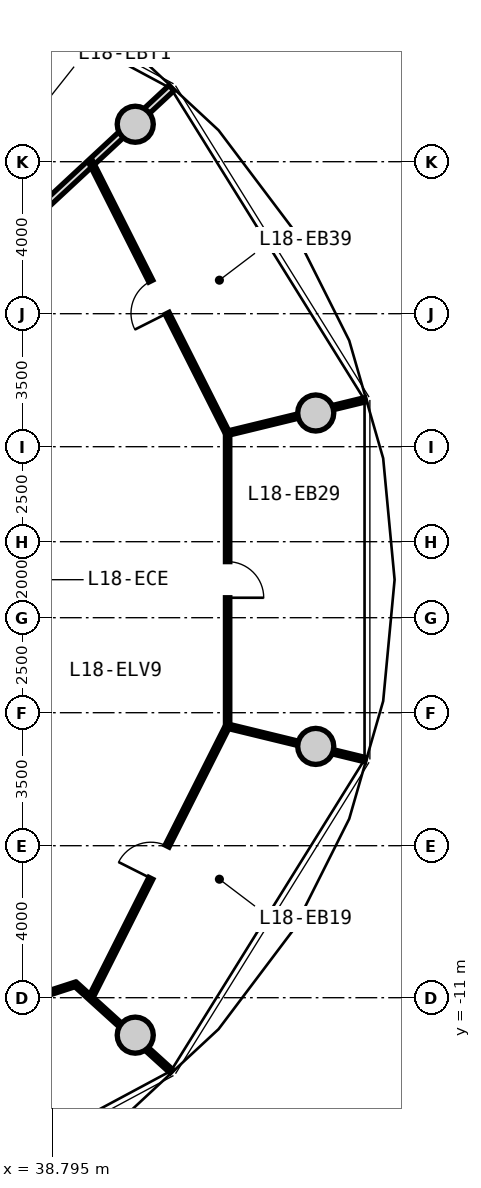
"""IFC4 building model, lengths in metres.
Left out: names, types, materials, properties, quantities, classifications, styles, units other than length and angle.
Written with IfcOpenShell. Run it as: python <this file> out.ifc"""

import sys

from ifc_helpers import new_model, si_unit, direction, frame, frame_2d, origin, origin_2d, place, context, subcontext, project, spatial, rectangle, circle, extrude, source, transform, mapped, element, fill, save


model = new_model("IFC4")
c1 = context("Model", 3, precision=1e-05, world=origin(), true_north=direction((0.0, 1.0)))
c2 = subcontext(c1, "Body", "Model", "MODEL_VIEW")
j1 = project(units=[si_unit("LENGTHUNIT", "METRE"), si_unit("PLANEANGLEUNIT", "RADIAN")], contexts=[c1])
p1 = place(None, origin())
s1 = spatial("IfcSite", under=j1, at=p1, CompositionType="ELEMENT")
p2 = place(p1, origin())
s2 = spatial("IfcBuilding", under=s1, at=p2, CompositionType="ELEMENT")
p3 = place(p2, frame((0.0, 0.0, 61.25)))
s3 = spatial("IfcBuildingStorey", under=s2, at=p3, CompositionType="ELEMENT", Elevation=61.25)
m1 = source(origin(), c2, "Body", "SweptSolid", [
    extrude(circle(Radius=0.475, at=origin_2d()), origin(), (0.0, 0.0, 1.0), 3.05),
])
for number, where, z_axis, x_axis in (
    (1, (45.725, 4.387, 0.0), (0.0, 0.0, 1.0), (1.0, 0.0, 0.0)),
    (2, (40.975, 11.985, 0.0), (0.0, 0.0, 1.0), (1.0, 0.0, 0.0)),
    (3, (40.975, -11.985, 0.0), (0.0, 0.0, 1.0), (1.0, 0.0, 0.0)),
    (4, (45.725, -4.387, 0.0), (0.0, 0.0, 1.0), (1.0, 0.0, 0.0)),
):
    element("IfcColumn", number, at=place(p3, frame(where, z_axis=z_axis, x_axis=x_axis)), inside=s3, PredefinedType="COLUMN", context=c2, shape_type="MappedRepresentation", body=[
        mapped(m1, transform((0.0, 0.0, 0.0), x_axis=(1.0, 0.0, 0.0), y_axis=(0.0, 1.0, 0.0), z_axis=(0.0, 0.0, 1.0), scale=1.0)),
    ])
m2 = source(origin(), c2, "Body", "SweptSolid", [
    extrude(rectangle(XDim=7.435, YDim=0.19, at=frame_2d((3.717, 0.0))), origin(), (0.0, 0.0, 1.0), 2.225),
])
p4 = place(p3, frame((36.483, 7.88, 0.0), z_axis=(0.0, 0.0, 1.0), x_axis=(0.732651956848, 0.680603489652, 0.0)))
e5 = element("IfcWall", 5, at=p4, inside=s3, PredefinedType="PARTITIONING", context=c2, shape_type="MappedRepresentation", body=[
    mapped(m2, transform((0.0, 0.0, 0.0), x_axis=(1.0, 0.0, 0.0), y_axis=(0.0, 1.0, 0.0), z_axis=(0.0, 0.0, 1.0), scale=1.0)),
])
m3 = source(origin(), c2, "Body", "SweptSolid", [
    extrude(rectangle(XDim=8.018, YDim=0.115, at=frame_2d((4.009, 0.0))), origin(), (0.0, 0.0, 1.0), 2.775),
])
p5 = place(p3, frame((39.795, -11.014, 0.0), z_axis=(0.0, 0.0, 1.0), x_axis=(0.450134355233, 0.89296084026, 0.0)))
e6 = element("IfcWall", 6, at=p5, inside=s3, PredefinedType="PARTITIONING", context=c2, shape_type="MappedRepresentation", body=[
    mapped(m3, transform((0.0, 0.0, 0.0), x_axis=(1.0, 0.0, 0.0), y_axis=(0.0, 1.0, 0.0), z_axis=(0.0, 0.0, 1.0), scale=1.0)),
])
p6 = place(p5, frame((3.534, 0.0, 0.0)))
e7 = element("IfcOpeningElement", 7, at=p6, cuts=e6, PredefinedType="OPENING", context=c2, shape_type="SweptSolid", body=[
    extrude(rectangle(XDim=0.95, YDim=2.1, at=frame_2d((0.475, 1.05))), frame((0.0, 0.067, 0.0), z_axis=(0.0, -1.0, 0.0), x_axis=(1.0, 0.0, 0.0)), (0.0, 0.0, 1.0), 0.135),
])
m4 = source(origin(), c2, "Body", "SweptSolid", [
    extrude(rectangle(XDim=3.4, YDim=0.115, at=frame_2d((1.7, 0.0))), origin(), (0.0, 0.0, 1.0), 2.225),
])
p7 = place(p3, frame((39.411, -10.656, 0.0), z_axis=(0.0, 0.0, 1.0), x_axis=(0.740729005272, -0.671803945172, 0.0)))
e8 = element("IfcWall", 8, at=p7, inside=s3, PredefinedType="PARTITIONING", context=c2, shape_type="MappedRepresentation", body=[
    mapped(m4, transform((0.0, 0.0, 0.0), x_axis=(1.0, 0.0, 0.0), y_axis=(0.0, 1.0, 0.0), z_axis=(0.0, 0.0, 1.0), scale=1.0)),
])
m5 = source(origin(), c2, "Body", "SweptSolid", [
    extrude(rectangle(XDim=7.709, YDim=0.115, at=frame_2d((3.855, 0.0))), origin(), (0.0, 0.0, 1.0), 2.775),
])
p8 = place(p3, frame((43.406, -3.855, 0.0), z_axis=(0.0, 0.0, 1.0), x_axis=(0.0, 1.0, 0.0)))
e9 = element("IfcWall", 9, at=p8, inside=s3, PredefinedType="PARTITIONING", context=c2, shape_type="MappedRepresentation", body=[
    mapped(m5, transform((0.0, 0.0, 0.0), x_axis=(1.0, 0.0, 0.0), y_axis=(0.0, 1.0, 0.0), z_axis=(0.0, 0.0, 1.0), scale=1.0)),
])
p9 = place(p8, frame((3.38, 0.0, 0.0)))
e10 = element("IfcOpeningElement", 10, at=p9, cuts=e9, PredefinedType="OPENING", context=c2, shape_type="SweptSolid", body=[
    extrude(rectangle(XDim=0.95, YDim=2.1, at=frame_2d((0.475, 1.05))), frame((0.0, 0.067, 0.0), z_axis=(0.0, -1.0, 0.0), x_axis=(1.0, 0.0, 0.0)), (0.0, 0.0, 1.0), 0.135),
])
m6 = source(origin(), c2, "Body", "SweptSolid", [
    extrude(rectangle(XDim=3.728, YDim=0.115, at=frame_2d((1.864, 0.0))), origin(), (0.0, 0.0, 1.0), 2.225),
])
p10 = place(p3, frame((43.406, -3.855, 0.0), z_axis=(0.0, 0.0, 1.0), x_axis=(0.971641177968, -0.236460189624, 0.0)))
e11 = element("IfcWall", 11, at=p10, inside=s3, PredefinedType="PARTITIONING", context=c2, shape_type="MappedRepresentation", body=[
    mapped(m6, transform((0.0, 0.0, 0.0), x_axis=(1.0, 0.0, 0.0), y_axis=(0.0, 1.0, 0.0), z_axis=(0.0, 0.0, 1.0), scale=1.0)),
])
p11 = place(p3, frame((43.404, 3.854, 0.0), z_axis=(0.0, 0.0, 1.0), x_axis=(-0.450134355233, 0.89296084026, 0.0)))
e12 = element("IfcWall", 12, at=p11, inside=s3, PredefinedType="PARTITIONING", context=c2, shape_type="MappedRepresentation", body=[
    mapped(m3, transform((0.0, 0.0, 0.0), x_axis=(1.0, 0.0, 0.0), y_axis=(0.0, 1.0, 0.0), z_axis=(0.0, 0.0, 1.0), scale=1.0)),
])
p12 = place(p11, frame((3.534, 0.0, 0.0)))
e13 = element("IfcOpeningElement", 13, at=p12, cuts=e12, PredefinedType="OPENING", context=c2, shape_type="SweptSolid", body=[
    extrude(rectangle(XDim=0.95, YDim=2.1, at=frame_2d((0.475, 1.05))), frame((0.0, 0.067, 0.0), z_axis=(0.0, -1.0, 0.0), x_axis=(1.0, 0.0, 0.0)), (0.0, 0.0, 1.0), 0.135),
])
m7 = source(origin(), c2, "Body", "SweptSolid", [
    extrude(rectangle(XDim=3.73, YDim=0.115, at=frame_2d((1.865, 0.0))), origin(), (0.0, 0.0, 1.0), 2.225),
])
p13 = place(p3, frame((43.404, 3.854, 0.0), z_axis=(0.0, 0.0, 1.0), x_axis=(0.971644038568, 0.236448434791, 0.0)))
e14 = element("IfcWall", 14, at=p13, inside=s3, PredefinedType="PARTITIONING", context=c2, shape_type="MappedRepresentation", body=[
    mapped(m7, transform((0.0, 0.0, 0.0), x_axis=(1.0, 0.0, 0.0), y_axis=(0.0, 1.0, 0.0), z_axis=(0.0, 0.0, 1.0), scale=1.0)),
])
m8 = source(origin(), c2, "Body", "SweptSolid", [
    extrude(rectangle(XDim=4.22, YDim=0.115, at=frame_2d((2.11, 0.0))), origin(), (0.0, 0.0, 1.0), 2.775),
])
p14 = place(p3, frame((35.389, -11.95, 0.0), z_axis=(0.0, 0.0, 1.0), x_axis=(0.951130539873, 0.308789080315, 0.0)))
e15 = element("IfcWall", 15, at=p14, inside=s3, PredefinedType="PARTITIONING", context=c2, shape_type="MappedRepresentation", body=[
    mapped(m8, transform((0.0, 0.0, 0.0), x_axis=(1.0, 0.0, 0.0), y_axis=(0.0, 1.0, 0.0), z_axis=(0.0, 0.0, 1.0), scale=1.0)),
])
p15 = place(p14, frame((1.635, 0.0, 0.0)))
e16 = element("IfcOpeningElement", 16, at=p15, cuts=e15, PredefinedType="OPENING", context=c2, shape_type="SweptSolid", body=[
    extrude(rectangle(XDim=0.95, YDim=2.1, at=frame_2d((0.475, 1.05))), frame((0.0, 0.067, 0.0), z_axis=(0.0, -1.0, 0.0), x_axis=(1.0, 0.0, 0.0)), (0.0, 0.0, 1.0), 0.135),
])
m9 = source(origin(), c2, "Body", "SweptSolid", [
    extrude(rectangle(XDim=0.95, YDim=2.1, at=frame_2d((0.475, 1.05))), frame((0.0, 0.025, 0.0), z_axis=(0.0, -1.0, 0.0), x_axis=(1.0, 0.0, 0.0)), (0.0, 0.0, 1.0), 0.05),
])
p16 = place(p6, origin())
e17 = element("IfcDoor", 17, at=p16, inside=s3, OperationType="SINGLE_SWING_LEFT", PredefinedType="DOOR", context=c2, shape_type="MappedRepresentation", body=[
    mapped(m9, transform((0.0, 0.0, 0.0), x_axis=(1.0, 0.0, 0.0), y_axis=(0.0, 1.0, 0.0), z_axis=(0.0, 0.0, 1.0), scale=1.0)),
])
fill(e7, e17)
p17 = place(p9, frame((0.95, 0.0, 0.0), z_axis=(0.0, 0.0, 1.0), x_axis=(-1.0, 0.0, 0.0)))
e18 = element("IfcDoor", 18, at=p17, inside=s3, OperationType="SINGLE_SWING_RIGHT", PredefinedType="DOOR", context=c2, shape_type="MappedRepresentation", body=[
    mapped(m9, transform((0.0, 0.0, 0.0), x_axis=(1.0, 0.0, 0.0), y_axis=(0.0, 1.0, 0.0), z_axis=(0.0, 0.0, 1.0), scale=1.0)),
])
fill(e10, e18)
p18 = place(p12, origin())
e19 = element("IfcDoor", 19, at=p18, inside=s3, OperationType="SINGLE_SWING_LEFT", PredefinedType="DOOR", context=c2, shape_type="MappedRepresentation", body=[
    mapped(m9, transform((0.0, 0.0, 0.0), x_axis=(1.0, 0.0, 0.0), y_axis=(0.0, 1.0, 0.0), z_axis=(0.0, 0.0, 1.0), scale=1.0)),
])
fill(e13, e19)
save(model, sys.argv[1])
